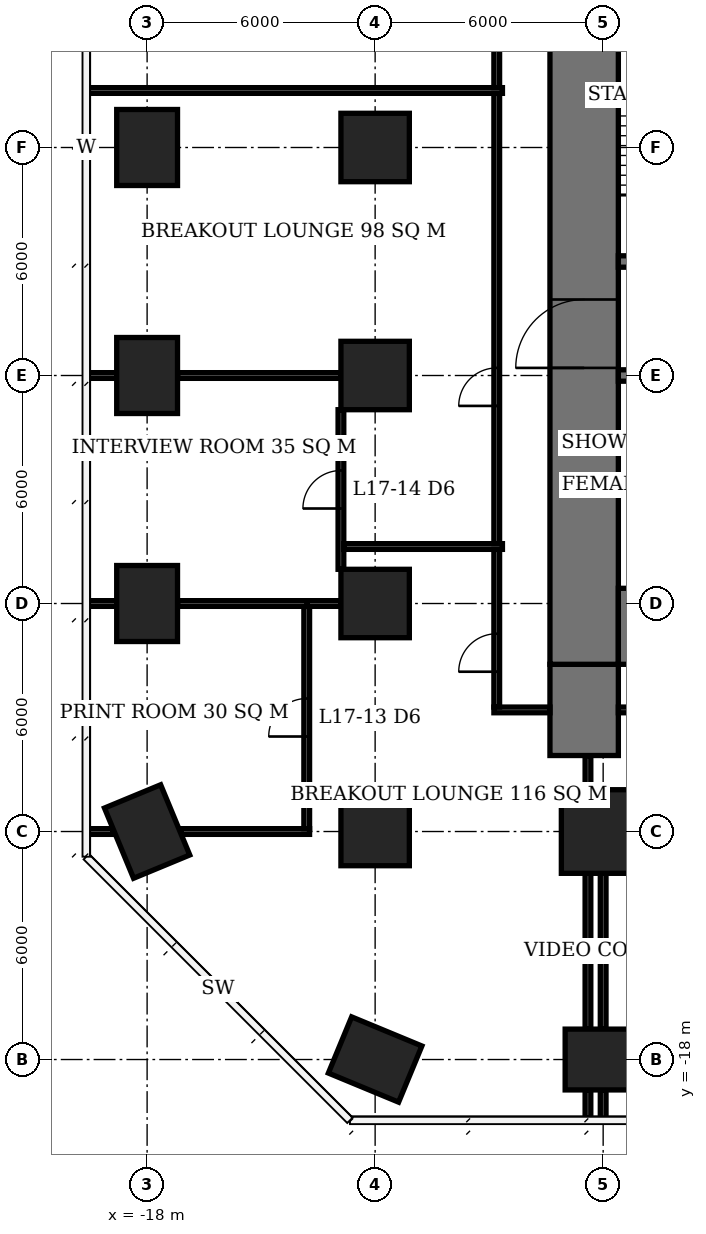
"""IFC4 building model, lengths in metres.
Left out: names, types, materials, properties, quantities, classifications, styles, units other than length and angle.
Written with IfcOpenShell. Run it as: python <this file> out.ifc"""

import sys

from ifc_helpers import new_model, si_unit, direction, frame, frame_2d, origin, origin_2d, place, context, subcontext, project, spatial, rectangle, extrude, element, fill, save


model = new_model("IFC4")
c1 = context("Model", 3, precision=1e-05, world=origin(), true_north=direction((0.0, 1.0)))
c2 = subcontext(c1, "Body", "Model", "MODEL_VIEW")
j1 = project(units=[si_unit("LENGTHUNIT", "METRE"), si_unit("PLANEANGLEUNIT", "RADIAN")], contexts=[c1])
p1 = place(None, origin())
s1 = spatial("IfcSite", under=j1, at=p1, CompositionType="ELEMENT")
p2 = place(p1, origin())
s2 = spatial("IfcBuilding", under=s1, at=p2, CompositionType="ELEMENT")
p3 = place(p2, frame((0.0, 0.0, 72.8)))
s3 = spatial("IfcBuildingStorey", under=s2, at=p3, CompositionType="ELEMENT", Elevation=72.8)
for number, where, z_axis, x_axis in (
    (1, (-18.0, -12.0, 0.0), (0.0, 0.0, 1.0), (-0.383, 0.924, 0.0)),
    (2, (-18.0, -6.0, 0.0), (0.0, 0.0, 1.0), (0.0, 1.0, 0.0)),
    (3, (-18.0, 0.0, 0.0), (0.0, 0.0, 1.0), (0.0, 1.0, 0.0)),
    (4, (-18.0, 6.0, 0.0), (0.0, 0.0, 1.0), (0.0, 1.0, 0.0)),
    (5, (-12.0, -18.0, 0.0), (0.0, 0.0, 1.0), (-0.924, 0.383, 0.0)),
):
    element("IfcColumn", number, at=place(p3, frame(where, z_axis=z_axis, x_axis=x_axis)), inside=s3, PredefinedType="COLUMN", context=c2, shape_type="SweptSolid", body=[
        extrude(rectangle(XDim=2.0, YDim=1.6, at=origin_2d()), origin(), (0.0, 0.0, 1.0), 3.9),
    ])
for number, where, z_axis, x_axis in (
    (6, (-12.0, -12.0, 0.0), (0.0, 0.0, 1.0), (1.0, 0.0, 0.0)),
    (7, (-12.0, -6.0, 0.0), (0.0, 0.0, 1.0), (1.0, 0.0, 0.0)),
    (8, (-12.0, 0.0, 0.0), (0.0, 0.0, 1.0), (1.0, 0.0, 0.0)),
    (9, (-12.0, 6.0, 0.0), (0.0, 0.0, 1.0), (1.0, 0.0, 0.0)),
):
    element("IfcColumn", number, at=place(p3, frame(where, z_axis=z_axis, x_axis=x_axis)), inside=s3, PredefinedType="COLUMN", context=c2, shape_type="SweptSolid", body=[
        extrude(rectangle(XDim=1.8, YDim=1.8, at=origin_2d()), origin(), (0.0, 0.0, 1.0), 3.9),
    ])
p4 = place(p3, frame((-6.0, -18.0, 0.0), z_axis=(0.0, 0.0, 1.0), x_axis=(1.0, 0.0, 0.0)))
e10 = element("IfcColumn", 10, at=p4, inside=s3, PredefinedType="COLUMN", context=c2, shape_type="SweptSolid", body=[
    extrude(rectangle(XDim=2.0, YDim=1.6, at=origin_2d()), origin(), (0.0, 0.0, 1.0), 3.9),
])
p5 = place(p3, frame((-6.0, -12.0, 0.0), z_axis=(0.0, 0.0, 1.0), x_axis=(1.0, 0.0, 0.0)))
e11 = element("IfcColumn", 11, at=p5, inside=s3, PredefinedType="COLUMN", context=c2, shape_type="SweptSolid", body=[
    extrude(rectangle(XDim=2.2, YDim=2.2, at=origin_2d()), origin(), (0.0, 0.0, 1.0), 3.9),
])
p6 = place(p3, frame((-5.6, -6.6, 0.0), z_axis=(0.0, 0.0, 1.0), x_axis=(1.0, 0.0, 0.0)))
e12 = element("IfcWall", 12, at=p6, inside=s3, PredefinedType="SHEAR", context=c2, shape_type="SweptSolid", body=[
    extrude(rectangle(XDim=23.2, YDim=2.0, at=frame_2d((11.6, 0.0))), origin(), (0.0, 0.0, 1.0), 3.9),
])
p7 = place(p3, frame((-6.5, -7.6, 0.0), z_axis=(0.0, 0.0, 1.0), x_axis=(0.0, 1.0, 0.0)))
e13 = element("IfcWall", 13, at=p7, inside=s3, PredefinedType="SHEAR", context=c2, shape_type="SweptSolid", body=[
    extrude(rectangle(XDim=21.2, YDim=1.8, at=frame_2d((10.6, 0.0))), origin(), (0.0, 0.0, 1.0), 3.9),
])
p8 = place(p7, frame((7.8, 0.0, 0.0)))
e14 = element("IfcOpeningElement", 14, at=p8, cuts=e13, PredefinedType="OPENING", context=c2, shape_type="SweptSolid", body=[
    extrude(rectangle(XDim=1.8, YDim=2.4, at=frame_2d((0.9, 1.2))), frame((0.0, 0.91, 0.0), z_axis=(0.0, -1.0, 0.0), x_axis=(1.0, 0.0, 0.0)), (0.0, 0.0, 1.0), 1.82),
])
p9 = place(p3, frame((-6.5, -10.0, 0.0), z_axis=(0.0, 0.0, 1.0), x_axis=(0.0, 1.0, 0.0)))
e15 = element("IfcWall", 15, at=p9, inside=s3, PredefinedType="SHEAR", context=c2, shape_type="SweptSolid", body=[
    extrude(rectangle(XDim=2.4, YDim=1.8, at=frame_2d((1.2, 0.0))), origin(), (0.0, 0.0, 1.0), 3.9),
])
p10 = place(p3, frame((-5.6, 0.0, 0.0), z_axis=(0.0, 0.0, 1.0), x_axis=(1.0, 0.0, 0.0)))
e16 = element("IfcWall", 16, at=p10, inside=s3, PredefinedType="SHEAR", context=c2, shape_type="SweptSolid", body=[
    extrude(rectangle(XDim=17.75, YDim=0.3, at=frame_2d((8.875, 0.0))), origin(), (0.0, 0.0, 1.0), 3.9),
])
p11 = place(p10, frame((0.6, 0.0, 0.0)))
e17 = element("IfcOpeningElement", 17, at=p11, cuts=e16, PredefinedType="OPENING", context=c2, shape_type="SweptSolid", body=[
    extrude(rectangle(XDim=0.9, YDim=2.1, at=frame_2d((0.45, 1.05))), frame((0.0, 0.16, 0.0), z_axis=(0.0, -1.0, 0.0), x_axis=(1.0, 0.0, 0.0)), (0.0, 0.0, 1.0), 0.32),
])
p12 = place(p10, frame((3.7, 0.0, 0.0)))
e18 = element("IfcOpeningElement", 18, at=p12, cuts=e16, PredefinedType="OPENING", context=c2, shape_type="SweptSolid", body=[
    extrude(rectangle(XDim=0.9, YDim=2.1, at=frame_2d((0.45, 1.05))), frame((0.0, 0.16, 0.0), z_axis=(0.0, -1.0, 0.0), x_axis=(1.0, 0.0, 0.0)), (0.0, 0.0, 1.0), 0.32),
])
p13 = place(p3, frame((-5.6, 3.0, 0.0), z_axis=(0.0, 0.0, 1.0), x_axis=(1.0, 0.0, 0.0)))
e19 = element("IfcWall", 19, at=p13, inside=s3, PredefinedType="SHEAR", context=c2, shape_type="SweptSolid", body=[
    extrude(rectangle(XDim=5.45, YDim=0.3, at=frame_2d((2.725, 0.0))), origin(), (0.0, 0.0, 1.0), 3.9),
])
p14 = place(p13, frame((0.4, 0.0, 0.0)))
e20 = element("IfcOpeningElement", 20, at=p14, cuts=e19, PredefinedType="OPENING", context=c2, shape_type="SweptSolid", body=[
    extrude(rectangle(XDim=1.2, YDim=2.1, at=frame_2d((0.6, 1.05))), frame((0.0, 0.16, 0.0), z_axis=(0.0, -1.0, 0.0), x_axis=(1.0, 0.0, 0.0)), (0.0, 0.0, 1.0), 0.32),
])
p15 = place(p13, frame((3.95, 0.0, 0.0)))
e21 = element("IfcOpeningElement", 21, at=p15, cuts=e19, PredefinedType="OPENING", context=c2, shape_type="SweptSolid", body=[
    extrude(rectangle(XDim=0.9, YDim=2.1, at=frame_2d((0.45, 1.05))), frame((0.0, 0.16, 0.0), z_axis=(0.0, -1.0, 0.0), x_axis=(1.0, 0.0, 0.0)), (0.0, 0.0, 1.0), 0.32),
])
p16 = place(p3, frame((-19.6, -12.0, 0.0), z_axis=(0.0, 0.0, 1.0), x_axis=(1.0, 0.0, 0.0)))
e22 = element("IfcWall", 22, at=p16, inside=s3, PredefinedType="PARTITIONING", context=c2, shape_type="SweptSolid", body=[
    extrude(rectangle(XDim=0.703, YDim=0.15, at=frame_2d((0.352, 0.0))), origin(), (0.0, 0.0, 1.0), 3.65),
])
p17 = place(p3, frame((-17.103, -12.0, 0.0), z_axis=(0.0, 0.0, 1.0), x_axis=(1.0, 0.0, 0.0)))
e23 = element("IfcWall", 23, at=p17, inside=s3, PredefinedType="PARTITIONING", context=c2, shape_type="SweptSolid", body=[
    extrude(rectangle(XDim=3.378, YDim=0.15, at=frame_2d((1.689, 0.0))), origin(), (0.0, 0.0, 1.0), 3.65),
])
p18 = place(p3, frame((-19.6, -6.0, 0.0), z_axis=(0.0, 0.0, 1.0), x_axis=(1.0, 0.0, 0.0)))
e24 = element("IfcWall", 24, at=p18, inside=s3, PredefinedType="PARTITIONING", context=c2, shape_type="SweptSolid", body=[
    extrude(rectangle(XDim=0.8, YDim=0.15, at=frame_2d((0.4, 0.0))), origin(), (0.0, 0.0, 1.0), 3.65),
])
p19 = place(p3, frame((-17.2, -6.0, 0.0), z_axis=(0.0, 0.0, 1.0), x_axis=(1.0, 0.0, 0.0)))
e25 = element("IfcWall", 25, at=p19, inside=s3, PredefinedType="PARTITIONING", context=c2, shape_type="SweptSolid", body=[
    extrude(rectangle(XDim=3.475, YDim=0.15, at=frame_2d((1.737, 0.0))), origin(), (0.0, 0.0, 1.0), 3.65),
])
p20 = place(p3, frame((-13.8, -6.0, 0.0), z_axis=(0.0, 0.0, 1.0), x_axis=(1.0, 0.0, 0.0)))
e26 = element("IfcWall", 26, at=p20, inside=s3, PredefinedType="PARTITIONING", context=c2, shape_type="SweptSolid", body=[
    extrude(rectangle(XDim=0.9, YDim=0.15, at=frame_2d((0.45, 0.0))), origin(), (0.0, 0.0, 1.0), 3.65),
])
p21 = place(p3, frame((-19.6, 0.0, 0.0), z_axis=(0.0, 0.0, 1.0), x_axis=(1.0, 0.0, 0.0)))
e27 = element("IfcWall", 27, at=p21, inside=s3, PredefinedType="PARTITIONING", context=c2, shape_type="SweptSolid", body=[
    extrude(rectangle(XDim=0.8, YDim=0.15, at=frame_2d((0.4, 0.0))), origin(), (0.0, 0.0, 1.0), 3.65),
])
p22 = place(p3, frame((-17.2, 0.0, 0.0), z_axis=(0.0, 0.0, 1.0), x_axis=(1.0, 0.0, 0.0)))
e28 = element("IfcWall", 28, at=p22, inside=s3, PredefinedType="PARTITIONING", context=c2, shape_type="SweptSolid", body=[
    extrude(rectangle(XDim=4.3, YDim=0.15, at=frame_2d((2.15, 0.0))), origin(), (0.0, 0.0, 1.0), 3.65),
])
p23 = place(p3, frame((-13.8, -11.925, 0.0), z_axis=(0.0, 0.0, 1.0), x_axis=(0.0, 1.0, 0.0)))
e29 = element("IfcWall", 29, at=p23, inside=s3, PredefinedType="PARTITIONING", context=c2, shape_type="SweptSolid", body=[
    extrude(rectangle(XDim=5.85, YDim=0.15, at=frame_2d((2.925, 0.0))), origin(), (0.0, 0.0, 1.0), 3.65),
])
p24 = place(p23, frame((2.425, 0.0, 0.0)))
e30 = element("IfcOpeningElement", 30, at=p24, cuts=e29, PredefinedType="OPENING", context=c2, shape_type="SweptSolid", body=[
    extrude(rectangle(XDim=1.0, YDim=2.1, at=frame_2d((0.5, 1.05))), frame((0.0, 0.085, 0.0), z_axis=(0.0, -1.0, 0.0), x_axis=(1.0, 0.0, 0.0)), (0.0, 0.0, 1.0), 0.17),
])
p25 = place(p3, frame((-12.9, -5.1, 0.0), z_axis=(0.0, 0.0, 1.0), x_axis=(0.0, 1.0, 0.0)))
e31 = element("IfcWall", 31, at=p25, inside=s3, PredefinedType="PARTITIONING", context=c2, shape_type="SweptSolid", body=[
    extrude(rectangle(XDim=4.2, YDim=0.15, at=frame_2d((2.1, 0.0))), origin(), (0.0, 0.0, 1.0), 3.65),
])
p26 = place(p25, frame((1.6, 0.0, 0.0)))
e32 = element("IfcOpeningElement", 32, at=p26, cuts=e31, PredefinedType="OPENING", context=c2, shape_type="SweptSolid", body=[
    extrude(rectangle(XDim=1.0, YDim=2.1, at=frame_2d((0.5, 1.05))), frame((0.0, 0.085, 0.0), z_axis=(0.0, -1.0, 0.0), x_axis=(1.0, 0.0, 0.0)), (0.0, 0.0, 1.0), 0.17),
])
p27 = place(p3, frame((-6.0, -19.6, 0.0), z_axis=(0.0, 0.0, 1.0), x_axis=(0.0, 1.0, 0.0)))
e33 = element("IfcWall", 33, at=p27, inside=s3, PredefinedType="PARTITIONING", context=c2, shape_type="SweptSolid", body=[
    extrude(rectangle(XDim=0.8, YDim=0.15, at=frame_2d((0.4, 0.0))), origin(), (0.0, 0.0, 1.0), 3.65),
])
p28 = place(p3, frame((-6.0, -17.2, 0.0), z_axis=(0.0, 0.0, 1.0), x_axis=(0.0, 1.0, 0.0)))
e34 = element("IfcWall", 34, at=p28, inside=s3, PredefinedType="PARTITIONING", context=c2, shape_type="SweptSolid", body=[
    extrude(rectangle(XDim=4.1, YDim=0.15, at=frame_2d((2.05, 0.0))), origin(), (0.0, 0.0, 1.0), 3.65),
])
p29 = place(p3, frame((-19.6, 7.5, 0.0), z_axis=(0.0, 0.0, 1.0), x_axis=(1.0, 0.0, 0.0)))
e35 = element("IfcWall", 35, at=p29, inside=s3, PredefinedType="PARTITIONING", context=c2, shape_type="SweptSolid", body=[
    extrude(rectangle(XDim=10.95, YDim=0.15, at=frame_2d((5.475, 0.0))), origin(), (0.0, 0.0, 1.0), 3.65),
])
p30 = place(p3, frame((-12.825, -4.5, 0.0), z_axis=(0.0, 0.0, 1.0), x_axis=(1.0, 0.0, 0.0)))
e36 = element("IfcWall", 36, at=p30, inside=s3, PredefinedType="PARTITIONING", context=c2, shape_type="SweptSolid", body=[
    extrude(rectangle(XDim=4.175, YDim=0.15, at=frame_2d((2.087, 0.0))), origin(), (0.0, 0.0, 1.0), 3.65),
])
p31 = place(p3, frame((-8.8, -8.725, 0.0), z_axis=(0.0, 0.0, 1.0), x_axis=(0.0, 1.0, 0.0)))
e37 = element("IfcWall", 37, at=p31, inside=s3, PredefinedType="PARTITIONING", context=c2, shape_type="SweptSolid", body=[
    extrude(rectangle(XDim=4.15, YDim=0.15, at=frame_2d((2.075, 0.0))), origin(), (0.0, 0.0, 1.0), 3.65),
])
p32 = place(p31, frame((0.93, 0.0, 0.0)))
e38 = element("IfcOpeningElement", 38, at=p32, cuts=e37, PredefinedType="OPENING", context=c2, shape_type="SweptSolid", body=[
    extrude(rectangle(XDim=1.0, YDim=2.1, at=frame_2d((0.5, 1.05))), frame((0.0, 0.085, 0.0), z_axis=(0.0, -1.0, 0.0), x_axis=(1.0, 0.0, 0.0)), (0.0, 0.0, 1.0), 0.17),
])
p33 = place(p3, frame((-8.875, -8.8, 0.0), z_axis=(0.0, 0.0, 1.0), x_axis=(1.0, 0.0, 0.0)))
e39 = element("IfcWall", 39, at=p33, inside=s3, PredefinedType="PARTITIONING", context=c2, shape_type="SweptSolid", body=[
    extrude(rectangle(XDim=1.475, YDim=0.15, at=frame_2d((0.738, 0.0))), origin(), (0.0, 0.0, 1.0), 3.65),
])
p34 = place(p3, frame((-8.8, -4.425, 0.0), z_axis=(0.0, 0.0, 1.0), x_axis=(0.0, 1.0, 0.0)))
e40 = element("IfcWall", 40, at=p34, inside=s3, PredefinedType="PARTITIONING", context=c2, shape_type="SweptSolid", body=[
    extrude(rectangle(XDim=11.85, YDim=0.15, at=frame_2d((5.925, 0.0))), origin(), (0.0, 0.0, 1.0), 3.65),
])
p35 = place(p34, frame((3.625, 0.0, 0.0)))
e41 = element("IfcOpeningElement", 41, at=p35, cuts=e40, PredefinedType="OPENING", context=c2, shape_type="SweptSolid", body=[
    extrude(rectangle(XDim=1.0, YDim=2.1, at=frame_2d((0.5, 1.05))), frame((0.0, 0.085, 0.0), z_axis=(0.0, -1.0, 0.0), x_axis=(1.0, 0.0, 0.0)), (0.0, 0.0, 1.0), 0.17),
])
p36 = place(p3, frame((-8.8, 7.575, 0.0), z_axis=(0.0, 0.0, 1.0), x_axis=(0.0, 1.0, 0.0)))
e42 = element("IfcWall", 42, at=p36, inside=s3, PredefinedType="PARTITIONING", context=c2, shape_type="SweptSolid", body=[
    extrude(rectangle(XDim=5.85, YDim=0.15, at=frame_2d((2.925, 0.0))), origin(), (0.0, 0.0, 1.0), 3.65),
])
p37 = place(p36, frame((1.525, 0.0, 0.0)))
e43 = element("IfcOpeningElement", 43, at=p37, cuts=e42, PredefinedType="OPENING", context=c2, shape_type="SweptSolid", body=[
    extrude(rectangle(XDim=1.0, YDim=2.1, at=frame_2d((0.5, 1.05))), frame((0.0, 0.085, 0.0), z_axis=(0.0, -1.0, 0.0), x_axis=(1.0, 0.0, 0.0)), (0.0, 0.0, 1.0), 0.17),
])
p38 = place(p3, frame((-6.4, -19.55, 0.0), z_axis=(0.0, 0.0, 1.0), x_axis=(0.0, 1.0, 0.0)))
e44 = element("IfcWall", 44, at=p38, inside=s3, PredefinedType="PARTITIONING", context=c2, shape_type="SweptSolid", body=[
    extrude(rectangle(XDim=0.75, YDim=0.15, at=frame_2d((0.375, 0.0))), origin(), (0.0, 0.0, 1.0), 3.65),
])
p39 = place(p3, frame((-6.4, -17.2, 0.0), z_axis=(0.0, 0.0, 1.0), x_axis=(0.0, 1.0, 0.0)))
e45 = element("IfcWall", 45, at=p39, inside=s3, PredefinedType="PARTITIONING", context=c2, shape_type="SweptSolid", body=[
    extrude(rectangle(XDim=4.1, YDim=0.15, at=frame_2d((2.05, 0.0))), origin(), (0.0, 0.0, 1.0), 3.65),
])
p40 = place(p3, frame((-6.4, -10.9, 0.0), z_axis=(0.0, 0.0, 1.0), x_axis=(0.0, 1.0, 0.0)))
e46 = element("IfcWall", 46, at=p40, inside=s3, PredefinedType="PARTITIONING", context=c2, shape_type="SweptSolid", body=[
    extrude(rectangle(XDim=0.9, YDim=0.15, at=frame_2d((0.45, 0.0))), origin(), (0.0, 0.0, 1.0), 3.65),
])
p41 = place(p3, frame((-5.6, -8.8, 0.0), z_axis=(0.0, 0.0, 1.0), x_axis=(1.0, 0.0, 0.0)))
e47 = element("IfcWall", 47, at=p41, inside=s3, PredefinedType="PARTITIONING", context=c2, shape_type="SweptSolid", body=[
    extrude(rectangle(XDim=7.025, YDim=0.15, at=frame_2d((3.513, 0.0))), origin(), (0.0, 0.0, 1.0), 3.65),
])
p42 = place(p41, frame((1.985, 0.0, 0.0)))
e48 = element("IfcOpeningElement", 48, at=p42, cuts=e47, PredefinedType="OPENING", context=c2, shape_type="SweptSolid", body=[
    extrude(rectangle(XDim=1.0, YDim=2.1, at=frame_2d((0.5, 1.05))), frame((0.0, 0.085, 0.0), z_axis=(0.0, -1.0, 0.0), x_axis=(1.0, 0.0, 0.0)), (0.0, 0.0, 1.0), 0.17),
])
p43 = place(p8, origin())
e49 = element("IfcDoor", 49, at=p43, inside=s3, OperationType="DOUBLE_DOOR_SINGLE_SWING", PredefinedType="DOOR", context=c2, shape_type="SweptSolid", body=[
    extrude(rectangle(XDim=1.8, YDim=2.4, at=frame_2d((0.9, 1.2))), frame((0.0, 0.025, 0.0), z_axis=(0.0, -1.0, 0.0), x_axis=(1.0, 0.0, 0.0)), (0.0, 0.0, 1.0), 0.05),
])
fill(e14, e49)
p44 = place(p24, origin())
e50 = element("IfcDoor", 50, at=p44, inside=s3, OperationType="SINGLE_SWING_LEFT", PredefinedType="DOOR", context=c2, shape_type="SweptSolid", body=[
    extrude(rectangle(XDim=1.0, YDim=2.1, at=frame_2d((0.5, 1.05))), frame((0.0, 0.025, 0.0), z_axis=(0.0, -1.0, 0.0), x_axis=(1.0, 0.0, 0.0)), (0.0, 0.0, 1.0), 0.05),
])
fill(e30, e50)
p45 = place(p26, origin())
e51 = element("IfcDoor", 51, at=p45, inside=s3, OperationType="SINGLE_SWING_LEFT", PredefinedType="DOOR", context=c2, shape_type="SweptSolid", body=[
    extrude(rectangle(XDim=1.0, YDim=2.1, at=frame_2d((0.5, 1.05))), frame((0.0, 0.025, 0.0), z_axis=(0.0, -1.0, 0.0), x_axis=(1.0, 0.0, 0.0)), (0.0, 0.0, 1.0), 0.05),
])
fill(e32, e51)
p46 = place(p32, origin())
e52 = element("IfcDoor", 52, at=p46, inside=s3, OperationType="SINGLE_SWING_LEFT", PredefinedType="DOOR", context=c2, shape_type="SweptSolid", body=[
    extrude(rectangle(XDim=1.0, YDim=2.1, at=frame_2d((0.5, 1.05))), frame((0.0, 0.025, 0.0), z_axis=(0.0, -1.0, 0.0), x_axis=(1.0, 0.0, 0.0)), (0.0, 0.0, 1.0), 0.05),
])
fill(e38, e52)
p47 = place(p35, origin())
e53 = element("IfcDoor", 53, at=p47, inside=s3, OperationType="SINGLE_SWING_LEFT", PredefinedType="DOOR", context=c2, shape_type="SweptSolid", body=[
    extrude(rectangle(XDim=1.0, YDim=2.1, at=frame_2d((0.5, 1.05))), frame((0.0, 0.025, 0.0), z_axis=(0.0, -1.0, 0.0), x_axis=(1.0, 0.0, 0.0)), (0.0, 0.0, 1.0), 0.05),
])
fill(e41, e53)
save(model, sys.argv[1])
